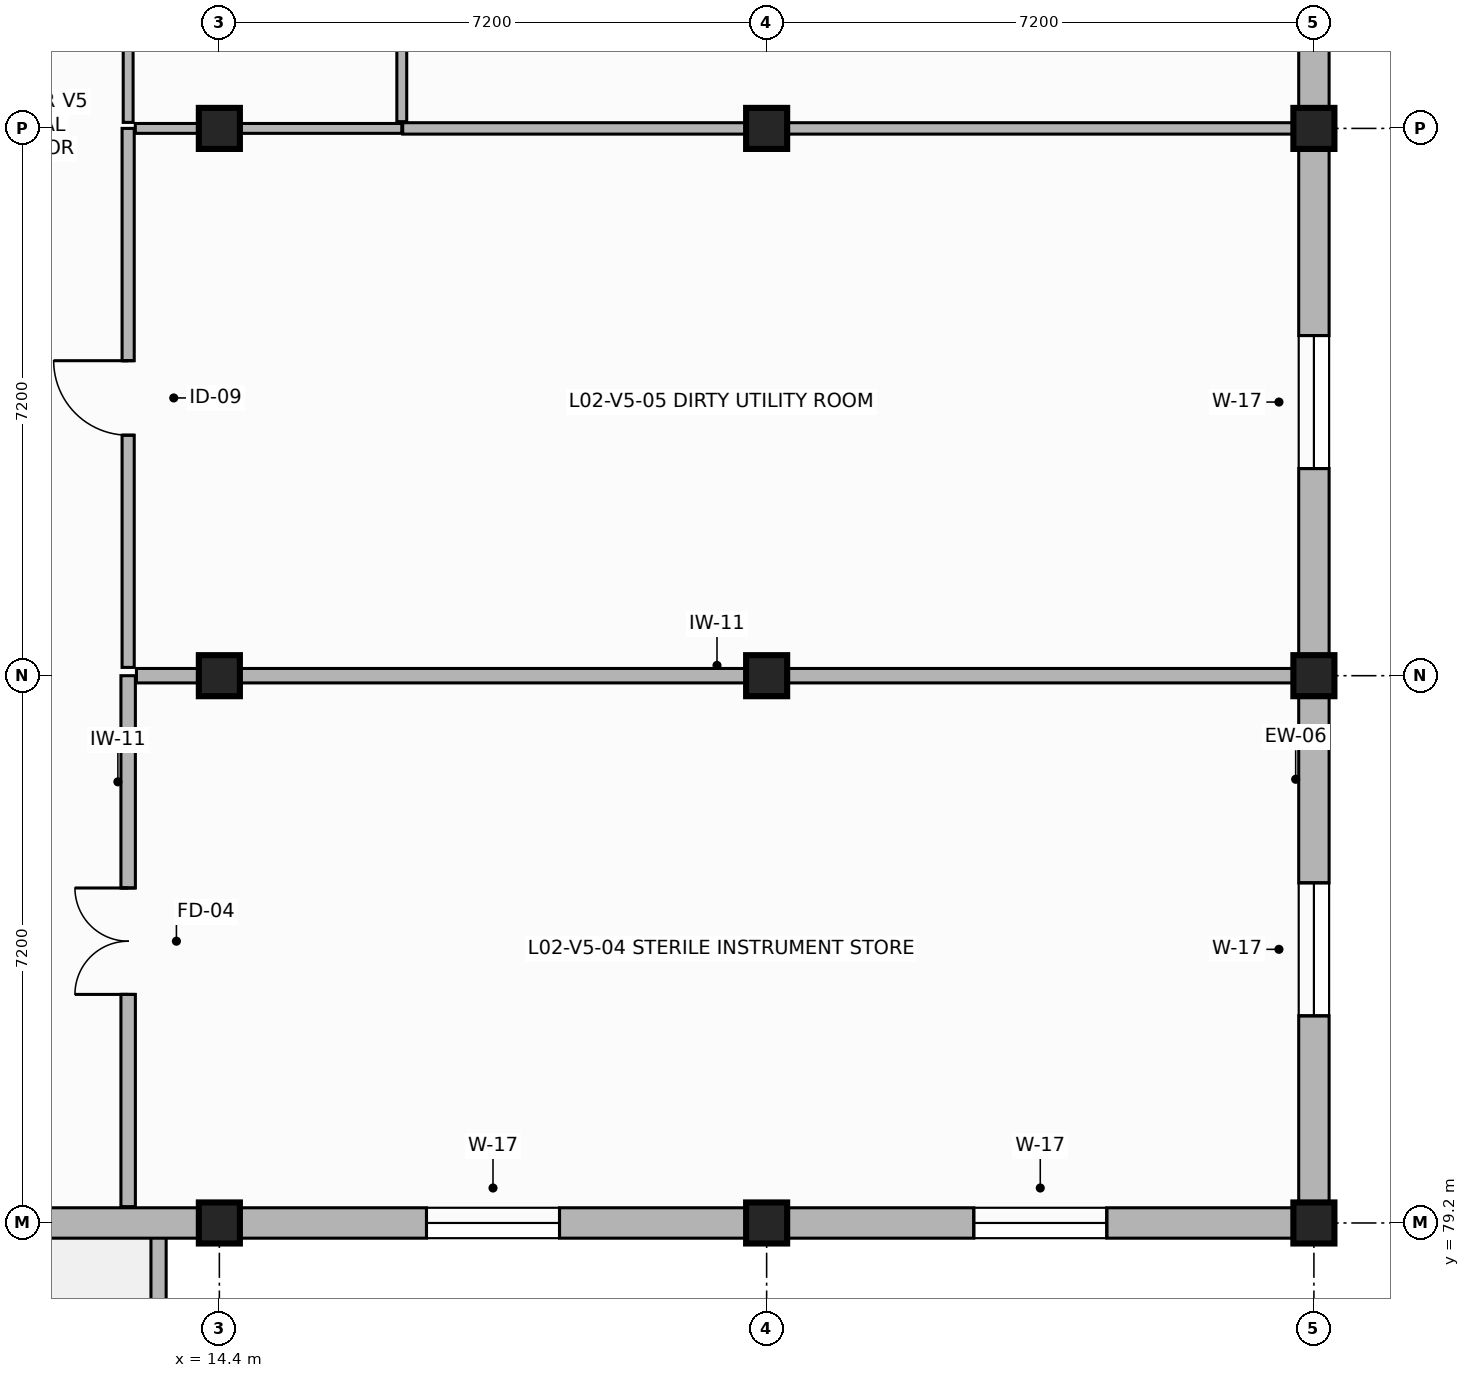
"""IFC4 building model, lengths in metres.
Left out: names, types, materials, properties, quantities, classifications, styles, units other than length and angle.
Written with IfcOpenShell. Run it as: python <this file> out.ifc"""

import sys

from ifc_helpers import new_model, si_unit, direction, frame, frame_2d, origin, origin_2d, place, context, subcontext, project, spatial, rectangle, extrude, element, fill, save


model = new_model("IFC4")
c1 = context("Model", 3, precision=1e-05, world=origin(), true_north=direction((0.0, 1.0)))
c2 = subcontext(c1, "Body", "Model", "MODEL_VIEW")
j1 = project(units=[si_unit("LENGTHUNIT", "METRE"), si_unit("PLANEANGLEUNIT", "RADIAN")], contexts=[c1])
p1 = place(None, origin())
s1 = spatial("IfcSite", under=j1, at=p1, CompositionType="ELEMENT")
p2 = place(p1, origin())
s2 = spatial("IfcBuilding", under=s1, at=p2, CompositionType="ELEMENT")
p3 = place(p2, frame((0.0, 0.0, 8.4)))
s3 = spatial("IfcBuildingStorey", under=s2, at=p3, CompositionType="ELEMENT", Elevation=8.4)
for number, where, z_axis, x_axis in (
    (1, (14.4, 79.2, 0.0), (0.0, 0.0, 1.0), (1.0, 0.0, 0.0)),
    (2, (14.4, 86.4, 0.0), (0.0, 0.0, 1.0), (1.0, 0.0, 0.0)),
    (3, (14.4, 93.6, 0.0), (0.0, 0.0, 1.0), (1.0, 0.0, 0.0)),
    (4, (21.6, 79.2, 0.0), (0.0, 0.0, 1.0), (1.0, 0.0, 0.0)),
    (5, (21.6, 86.4, 0.0), (0.0, 0.0, 1.0), (1.0, 0.0, 0.0)),
    (6, (21.6, 93.6, 0.0), (0.0, 0.0, 1.0), (1.0, 0.0, 0.0)),
    (7, (28.8, 79.2, 0.0), (0.0, 0.0, 1.0), (1.0, 0.0, 0.0)),
    (8, (28.8, 86.4, 0.0), (0.0, 0.0, 1.0), (1.0, 0.0, 0.0)),
    (9, (28.8, 93.6, 0.0), (0.0, 0.0, 1.0), (1.0, 0.0, 0.0)),
):
    element("IfcColumn", number, at=place(p3, frame(where, z_axis=z_axis, x_axis=x_axis)), inside=s3, PredefinedType="COLUMN", context=c2, shape_type="SweptSolid", body=[
        extrude(rectangle(XDim=0.54, YDim=0.54, at=origin_2d()), origin(), (0.0, 0.0, 1.0), 3.59),
    ])
p4 = place(p3, frame((13.6, 57.72, 0.4), z_axis=(0.0, 0.0, 1.0), x_axis=(0.0, 1.0, 0.0)))
e10 = element("IfcWall", 10, at=p4, inside=s3, PredefinedType="PARAPET", context=c2, shape_type="SweptSolid", body=[
    extrude(rectangle(XDim=21.36, YDim=0.2, at=frame_2d((10.68, 0.0))), origin(), (0.0, 0.0, 1.0), 0.95),
])
p5 = place(p3, frame((7.2, 79.2, 0.0), z_axis=(0.0, 0.0, 1.0), x_axis=(1.0, 0.0, 0.0)))
e11 = element("IfcWall", 11, at=p5, inside=s3, PredefinedType="SOLIDWALL", context=c2, shape_type="SweptSolid", body=[
    extrude(rectangle(XDim=7.2, YDim=0.4, at=frame_2d((3.6, 0.0))), origin(), (0.0, 0.0, 1.0), 2.92),
])
p6 = place(p5, frame((0.725, 0.0, 0.9)))
e12 = element("IfcOpeningElement", 12, at=p6, cuts=e11, PredefinedType="OPENING", context=c2, shape_type="SweptSolid", body=[
    extrude(rectangle(XDim=1.75, YDim=1.8, at=frame_2d((0.875, 0.9))), frame((0.0, 0.21, 0.0), z_axis=(0.0, -1.0, 0.0), x_axis=(1.0, 0.0, 0.0)), (0.0, 0.0, 1.0), 0.42),
])
p7 = place(p3, frame((14.4, 79.2, 0.0), z_axis=(0.0, 0.0, 1.0), x_axis=(1.0, 0.0, 0.0)))
e13 = element("IfcWall", 13, at=p7, inside=s3, PredefinedType="SOLIDWALL", context=c2, shape_type="SweptSolid", body=[
    extrude(rectangle(XDim=7.2, YDim=0.4, at=frame_2d((3.6, 0.0))), origin(), (0.0, 0.0, 1.0), 2.92),
])
p8 = place(p7, frame((2.725, 0.0, 0.9)))
e14 = element("IfcOpeningElement", 14, at=p8, cuts=e13, PredefinedType="OPENING", context=c2, shape_type="SweptSolid", body=[
    extrude(rectangle(XDim=1.75, YDim=1.8, at=frame_2d((0.875, 0.9))), frame((0.0, 0.21, 0.0), z_axis=(0.0, -1.0, 0.0), x_axis=(1.0, 0.0, 0.0)), (0.0, 0.0, 1.0), 0.42),
])
p9 = place(p3, frame((21.6, 79.2, 0.0), z_axis=(0.0, 0.0, 1.0), x_axis=(1.0, 0.0, 0.0)))
e15 = element("IfcWall", 15, at=p9, inside=s3, PredefinedType="SOLIDWALL", context=c2, shape_type="SweptSolid", body=[
    extrude(rectangle(XDim=7.2, YDim=0.4, at=frame_2d((3.6, 0.0))), origin(), (0.0, 0.0, 1.0), 2.92),
])
p10 = place(p9, frame((2.725, 0.0, 0.9)))
e16 = element("IfcOpeningElement", 16, at=p10, cuts=e15, PredefinedType="OPENING", context=c2, shape_type="SweptSolid", body=[
    extrude(rectangle(XDim=1.75, YDim=1.8, at=frame_2d((0.875, 0.9))), frame((0.0, 0.21, 0.0), z_axis=(0.0, -1.0, 0.0), x_axis=(1.0, 0.0, 0.0)), (0.0, 0.0, 1.0), 0.42),
])
p11 = place(p3, frame((28.8, 79.2, 0.0), z_axis=(0.0, 0.0, 1.0), x_axis=(0.0, 1.0, 0.0)))
e17 = element("IfcWall", 17, at=p11, inside=s3, PredefinedType="SOLIDWALL", context=c2, shape_type="SweptSolid", body=[
    extrude(rectangle(XDim=7.2, YDim=0.4, at=frame_2d((3.6, 0.0))), origin(), (0.0, 0.0, 1.0), 2.92),
])
p12 = place(p11, frame((2.725, 0.0, 0.9)))
e18 = element("IfcOpeningElement", 18, at=p12, cuts=e17, PredefinedType="OPENING", context=c2, shape_type="SweptSolid", body=[
    extrude(rectangle(XDim=1.75, YDim=1.8, at=frame_2d((0.875, 0.9))), frame((0.0, 0.21, 0.0), z_axis=(0.0, -1.0, 0.0), x_axis=(1.0, 0.0, 0.0)), (0.0, 0.0, 1.0), 0.42),
])
p13 = place(p3, frame((28.8, 86.4, 0.0), z_axis=(0.0, 0.0, 1.0), x_axis=(0.0, 1.0, 0.0)))
e19 = element("IfcWall", 19, at=p13, inside=s3, PredefinedType="SOLIDWALL", context=c2, shape_type="SweptSolid", body=[
    extrude(rectangle(XDim=7.2, YDim=0.4, at=frame_2d((3.6, 0.0))), origin(), (0.0, 0.0, 1.0), 2.92),
])
p14 = place(p13, frame((2.725, 0.0, 0.9)))
e20 = element("IfcOpeningElement", 20, at=p14, cuts=e19, PredefinedType="OPENING", context=c2, shape_type="SweptSolid", body=[
    extrude(rectangle(XDim=1.75, YDim=1.8, at=frame_2d((0.875, 0.9))), frame((0.0, 0.21, 0.0), z_axis=(0.0, -1.0, 0.0), x_axis=(1.0, 0.0, 0.0)), (0.0, 0.0, 1.0), 0.42),
])
p15 = place(p3, frame((28.8, 93.6, 0.0), z_axis=(0.0, 0.0, 1.0), x_axis=(0.0, 1.0, 0.0)))
e21 = element("IfcWall", 21, at=p15, inside=s3, PredefinedType="SOLIDWALL", context=c2, shape_type="SweptSolid", body=[
    extrude(rectangle(XDim=7.2, YDim=0.4, at=frame_2d((3.6, 0.0))), origin(), (0.0, 0.0, 1.0), 2.92),
])
p16 = place(p15, frame((2.725, 0.0, 0.9)))
e22 = element("IfcOpeningElement", 22, at=p16, cuts=e21, PredefinedType="OPENING", context=c2, shape_type="SweptSolid", body=[
    extrude(rectangle(XDim=1.75, YDim=1.8, at=frame_2d((0.875, 0.9))), frame((0.0, 0.21, 0.0), z_axis=(0.0, -1.0, 0.0), x_axis=(1.0, 0.0, 0.0)), (0.0, 0.0, 1.0), 0.42),
])
p17 = place(p3, frame((13.2, 79.415, 0.0), z_axis=(0.0, 0.0, 1.0), x_axis=(0.0, 1.0, 0.0)))
e23 = element("IfcWall", 23, at=p17, inside=s3, PredefinedType="PARTITIONING", context=c2, shape_type="SweptSolid", body=[
    extrude(rectangle(XDim=6.985, YDim=0.19, at=frame_2d((3.492, 0.0))), origin(), (0.0, 0.0, 1.0), 2.9),
])
p18 = place(p17, frame((2.792, 0.0, 0.0)))
e24 = element("IfcOpeningElement", 24, at=p18, cuts=e23, PredefinedType="OPENING", context=c2, shape_type="SweptSolid", body=[
    extrude(rectangle(XDim=1.4, YDim=2.25, at=frame_2d((0.7, 1.125))), frame((0.0, 0.105, 0.0), z_axis=(0.0, -1.0, 0.0), x_axis=(1.0, 0.0, 0.0)), (0.0, 0.0, 1.0), 0.21),
])
p19 = place(p3, frame((13.309, 86.4, 0.0), z_axis=(0.0, 0.0, 1.0), x_axis=(1.0, 0.0, 0.0)))
e25 = element("IfcWall", 25, at=p19, inside=s3, PredefinedType="PARTITIONING", context=c2, shape_type="SweptSolid", body=[
    extrude(rectangle(XDim=15.276, YDim=0.19, at=frame_2d((7.638, 0.0))), origin(), (0.0, 0.0, 1.0), 2.9),
])
p20 = place(p3, frame((13.2, 86.509, 0.0), z_axis=(0.0, 0.0, 1.0), x_axis=(0.0, 1.0, 0.0)))
e26 = element("IfcWall", 26, at=p20, inside=s3, PredefinedType="PARTITIONING", context=c2, shape_type="SweptSolid", body=[
    extrude(rectangle(XDim=7.091, YDim=0.16, at=frame_2d((3.545, 0.0))), origin(), (0.0, 0.0, 1.0), 2.9),
])
p21 = place(p20, frame((3.055, 0.0, 0.0)))
e27 = element("IfcOpeningElement", 27, at=p21, cuts=e26, PredefinedType="OPENING", context=c2, shape_type="SweptSolid", body=[
    extrude(rectangle(XDim=0.98, YDim=2.15, at=frame_2d((0.49, 1.075))), frame((0.0, 0.09, 0.0), z_axis=(0.0, -1.0, 0.0), x_axis=(1.0, 0.0, 0.0)), (0.0, 0.0, 1.0), 0.18),
])
p22 = place(p3, frame((13.294, 93.6, 0.0), z_axis=(0.0, 0.0, 1.0), x_axis=(1.0, 0.0, 0.0)))
e28 = element("IfcWall", 28, at=p22, inside=s3, PredefinedType="PARTITIONING", context=c2, shape_type="SweptSolid", body=[
    extrude(rectangle(XDim=3.506, YDim=0.13, at=frame_2d((1.753, 0.0))), origin(), (0.0, 0.0, 1.0), 2.9),
])
p23 = place(p3, frame((16.812, 93.6, 0.0), z_axis=(0.0, 0.0, 1.0), x_axis=(1.0, 0.0, 0.0)))
e29 = element("IfcWall", 29, at=p23, inside=s3, PredefinedType="PARTITIONING", context=c2, shape_type="SweptSolid", body=[
    extrude(rectangle(XDim=11.773, YDim=0.15, at=frame_2d((5.886, 0.0))), origin(), (0.0, 0.0, 1.0), 2.9),
])
p24 = place(p3, frame((16.8, 98.121, 0.0), z_axis=(0.0, 0.0, 1.0), x_axis=(0.0, -1.0, 0.0)))
e30 = element("IfcWall", 30, at=p24, inside=s3, PredefinedType="PARTITIONING", context=c2, shape_type="SweptSolid", body=[
    extrude(rectangle(XDim=4.432, YDim=0.13, at=frame_2d((2.216, 0.0))), origin(), (0.0, 0.0, 1.0), 2.9),
])
p25 = place(p3, frame((13.2, 93.679, 0.0), z_axis=(0.0, 0.0, 1.0), x_axis=(0.0, 1.0, 0.0)))
e31 = element("IfcWall", 31, at=p25, inside=s3, PredefinedType="PARTITIONING", context=c2, shape_type="SweptSolid", body=[
    extrude(rectangle(XDim=4.442, YDim=0.13, at=frame_2d((2.221, 0.0))), origin(), (0.0, 0.0, 1.0), 2.9),
])
p26 = place(p25, frame((3.012, 0.0, 0.0)))
e32 = element("IfcOpeningElement", 32, at=p26, cuts=e31, PredefinedType="OPENING", context=c2, shape_type="SweptSolid", body=[
    extrude(rectangle(XDim=0.95, YDim=2.1, at=frame_2d((0.475, 1.05))), frame((0.0, 0.075, 0.0), z_axis=(0.0, -1.0, 0.0), x_axis=(1.0, 0.0, 0.0)), (0.0, 0.0, 1.0), 0.15),
])
p27 = place(p8, origin())
e33 = element("IfcWindow", 33, at=p27, inside=s3, PartitioningType="SINGLE_PANEL", PredefinedType="WINDOW", context=c2, shape_type="SweptSolid", body=[
    extrude(rectangle(XDim=1.75, YDim=1.8, at=frame_2d((0.875, 0.9))), frame((0.0, 0.03, 0.0), z_axis=(0.0, -1.0, 0.0), x_axis=(1.0, 0.0, 0.0)), (0.0, 0.0, 1.0), 0.06),
])
fill(e14, e33)
p28 = place(p10, origin())
e34 = element("IfcWindow", 34, at=p28, inside=s3, PartitioningType="SINGLE_PANEL", PredefinedType="WINDOW", context=c2, shape_type="SweptSolid", body=[
    extrude(rectangle(XDim=1.75, YDim=1.8, at=frame_2d((0.875, 0.9))), frame((0.0, 0.03, 0.0), z_axis=(0.0, -1.0, 0.0), x_axis=(1.0, 0.0, 0.0)), (0.0, 0.0, 1.0), 0.06),
])
fill(e16, e34)
p29 = place(p12, origin())
e35 = element("IfcWindow", 35, at=p29, inside=s3, PartitioningType="SINGLE_PANEL", PredefinedType="WINDOW", context=c2, shape_type="SweptSolid", body=[
    extrude(rectangle(XDim=1.75, YDim=1.8, at=frame_2d((0.875, 0.9))), frame((0.0, 0.03, 0.0), z_axis=(0.0, -1.0, 0.0), x_axis=(1.0, 0.0, 0.0)), (0.0, 0.0, 1.0), 0.06),
])
fill(e18, e35)
p30 = place(p14, origin())
e36 = element("IfcWindow", 36, at=p30, inside=s3, PartitioningType="SINGLE_PANEL", PredefinedType="WINDOW", context=c2, shape_type="SweptSolid", body=[
    extrude(rectangle(XDim=1.75, YDim=1.8, at=frame_2d((0.875, 0.9))), frame((0.0, 0.03, 0.0), z_axis=(0.0, -1.0, 0.0), x_axis=(1.0, 0.0, 0.0)), (0.0, 0.0, 1.0), 0.06),
])
fill(e20, e36)
p31 = place(p18, origin())
e37 = element("IfcDoor", 37, at=p31, inside=s3, OperationType="DOUBLE_DOOR_SINGLE_SWING", PredefinedType="DOOR", context=c2, shape_type="SweptSolid", body=[
    extrude(rectangle(XDim=1.4, YDim=2.25, at=frame_2d((0.7, 1.125))), frame((0.0, 0.025, 0.0), z_axis=(0.0, -1.0, 0.0), x_axis=(1.0, 0.0, 0.0)), (0.0, 0.0, 1.0), 0.05),
])
fill(e24, e37)
p32 = place(p21, origin())
e38 = element("IfcDoor", 38, at=p32, inside=s3, OperationType="SINGLE_SWING_RIGHT", PredefinedType="DOOR", context=c2, shape_type="SweptSolid", body=[
    extrude(rectangle(XDim=0.98, YDim=2.15, at=frame_2d((0.49, 1.075))), frame((0.0, 0.025, 0.0), z_axis=(0.0, -1.0, 0.0), x_axis=(1.0, 0.0, 0.0)), (0.0, 0.0, 1.0), 0.05),
])
fill(e27, e38)
save(model, sys.argv[1])
